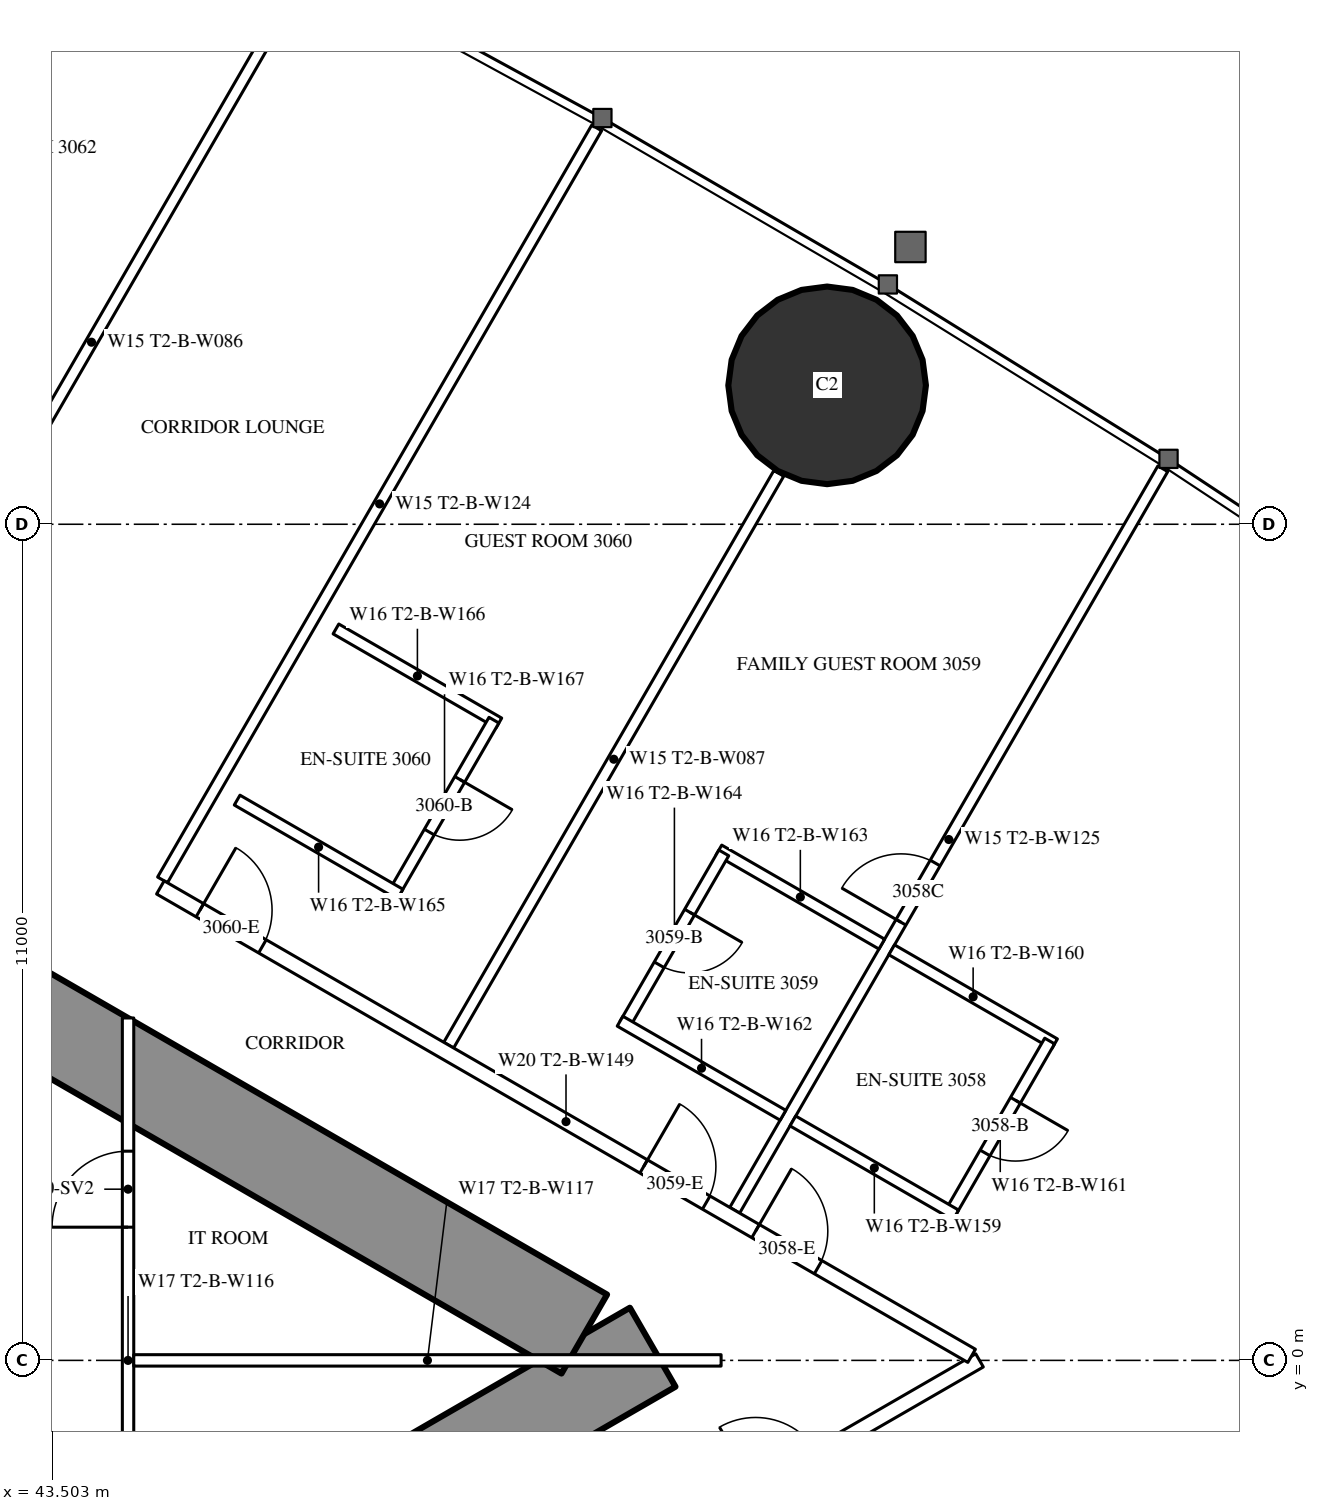
"""IFC4 building model, lengths in metres.
Left out: names, types, materials, properties, quantities, classifications, styles, units other than length and angle.
Written with IfcOpenShell. Run it as: python <this file> out.ifc"""

import sys

from ifc_helpers import new_model, si_unit, direction, frame, frame_2d, origin, origin_2d, place, context, subcontext, project, spatial, rectangle, hollow_circle, extrude, element, fill, save


model = new_model("IFC4")
c1 = context("Model", 3, precision=1e-05, world=origin(), true_north=direction((0.0, 1.0)))
c2 = subcontext(c1, "Body", "Model", "MODEL_VIEW")
j1 = project(units=[si_unit("LENGTHUNIT", "METRE"), si_unit("PLANEANGLEUNIT", "RADIAN")], contexts=[c1])
p1 = place(None, origin())
s1 = spatial("IfcSite", under=j1, at=p1, CompositionType="ELEMENT")
p2 = place(p1, origin())
s2 = spatial("IfcBuilding", under=s1, at=p2, CompositionType="ELEMENT")
p3 = place(p2, frame((0.0, 0.0, 115.1)))
s3 = spatial("IfcBuildingStorey", under=s2, at=p3, CompositionType="ELEMENT", Elevation=115.1)
p4 = place(p3, frame((53.697, 12.827, 0.0), z_axis=(0.0, 0.0, 1.0), x_axis=(1.0, 0.0, 0.0)))
e1 = element("IfcColumn", 1, at=p4, inside=s3, PredefinedType="COLUMN", context=c2, shape_type="SweptSolid", body=[
    extrude(hollow_circle(Radius=1.3, WallThickness=0.1, at=origin_2d()), origin(), (0.0, 0.0, 1.0), 3.5),
])
p5 = place(p3, frame((27.2, -13.8, 0.0), z_axis=(0.0, 0.0, 1.0), x_axis=(0.866027159892, 0.499996958321, 0.0)))
e2 = element("IfcWall", 2, at=p5, inside=s3, PredefinedType="SHEAR", context=c2, shape_type="SweptSolid", body=[
    extrude(rectangle(XDim=27.947, YDim=1.2, at=frame_2d((13.973, 0.0))), origin(), (0.0, 0.0, 1.0), 3.5),
])
p6 = place(p5, frame((4.6, 0.0, 0.0)))
e3 = element("IfcOpeningElement", 3, at=p6, cuts=e2, PredefinedType="OPENING", context=c2, shape_type="SweptSolid", body=[
    extrude(rectangle(XDim=1.0, YDim=2.2, at=frame_2d((0.5, 1.1))), frame((0.0, 0.61, 0.0), z_axis=(0.0, -1.0, 0.0), x_axis=(1.0, 0.0, 0.0)), (0.0, 0.0, 1.0), 1.22),
])
p7 = place(p5, frame((13.395, 0.0, 0.0)))
e4 = element("IfcOpeningElement", 4, at=p7, cuts=e2, PredefinedType="OPENING", context=c2, shape_type="SweptSolid", body=[
    extrude(rectangle(XDim=1.8, YDim=2.2, at=frame_2d((0.9, 1.1))), frame((0.0, 0.61, 0.0), z_axis=(0.0, -1.0, 0.0), x_axis=(1.0, 0.0, 0.0)), (0.0, 0.0, 1.0), 1.22),
])
p8 = place(p3, frame((27.2, 13.8, 0.0), z_axis=(0.0, 0.0, 1.0), x_axis=(0.866024515034, -0.500001539357, 0.0)))
e5 = element("IfcWall", 5, at=p8, inside=s3, PredefinedType="SHEAR", context=c2, shape_type="SweptSolid", body=[
    extrude(rectangle(XDim=26.907, YDim=1.2, at=frame_2d((13.454, 0.0))), origin(), (0.0, 0.0, 1.0), 3.5),
])
p9 = place(p8, frame((4.6, 0.0, 0.0)))
e6 = element("IfcOpeningElement", 6, at=p9, cuts=e5, PredefinedType="OPENING", context=c2, shape_type="SweptSolid", body=[
    extrude(rectangle(XDim=1.0, YDim=2.2, at=frame_2d((0.5, 1.1))), frame((0.0, 0.61, 0.0), z_axis=(0.0, -1.0, 0.0), x_axis=(1.0, 0.0, 0.0)), (0.0, 0.0, 1.0), 1.22),
])
p10 = place(p8, frame((13.395, 0.0, 0.0)))
e7 = element("IfcOpeningElement", 7, at=p10, cuts=e5, PredefinedType="OPENING", context=c2, shape_type="SweptSolid", body=[
    extrude(rectangle(XDim=1.8, YDim=2.2, at=frame_2d((0.9, 1.1))), frame((0.0, 0.61, 0.0), z_axis=(0.0, -1.0, 0.0), x_axis=(1.0, 0.0, 0.0)), (0.0, 0.0, 1.0), 1.22),
])
p11 = place(p3, frame((41.19, 8.494, 0.0), z_axis=(0.0, 0.0, 1.0), x_axis=(0.49999258054, 0.866029687369, 0.0)))
e8 = element("IfcWall", 8, at=p11, inside=s3, PredefinedType="PARTITIONING", context=c2, shape_type="SweptSolid", body=[
    extrude(rectangle(XDim=11.318, YDim=0.15, at=frame_2d((5.659, 0.0))), origin(), (0.0, 0.0, 1.0), 3.25),
])
p12 = place(p3, frame((44.954, 6.321, 0.0), z_axis=(0.0, 0.0, 1.0), x_axis=(0.500009815811, 0.866019736549, 0.0)))
e9 = element("IfcWall", 9, at=p12, inside=s3, PredefinedType="PARTITIONING", context=c2, shape_type="SweptSolid", body=[
    extrude(rectangle(XDim=11.424, YDim=0.15, at=frame_2d((5.712, 0.0))), origin(), (0.0, 0.0, 1.0), 3.25),
])
p13 = place(p3, frame((48.719, 4.147, 0.0), z_axis=(0.0, 0.0, 1.0), x_axis=(0.499993328235, 0.866029255696, 0.0)))
e10 = element("IfcWall", 10, at=p13, inside=s3, PredefinedType="PARTITIONING", context=c2, shape_type="SweptSolid", body=[
    extrude(rectangle(XDim=8.686, YDim=0.15, at=frame_2d((4.343, 0.0))), origin(), (0.0, 0.0, 1.0), 2.2),
])
p14 = place(p3, frame((52.481, 1.975, 0.0), z_axis=(0.0, 0.0, 1.0), x_axis=(0.500003867771, 0.866023170714, 0.0)))
e11 = element("IfcWall", 11, at=p14, inside=s3, PredefinedType="PARTITIONING", context=c2, shape_type="SweptSolid", body=[
    extrude(rectangle(XDim=11.265, YDim=0.15, at=frame_2d((5.632, 0.0))), origin(), (0.0, 0.0, 1.0), 3.25),
])
p15 = place(p14, frame((4.375, 0.0, 0.0)))
e12 = element("IfcOpeningElement", 12, at=p15, cuts=e11, PredefinedType="OPENING", context=c2, shape_type="SweptSolid", body=[
    extrude(rectangle(XDim=0.9, YDim=2.2, at=frame_2d((0.45, 1.1))), frame((0.0, 0.085, 0.0), z_axis=(0.0, -1.0, 0.0), x_axis=(1.0, 0.0, 0.0)), (0.0, 0.0, 1.0), 0.17),
])
p16 = place(p3, frame((37.96, -10.243, 0.0), z_axis=(0.0, 0.0, 1.0), x_axis=(0.866026429433, 0.499998223521, 0.0)))
e13 = element("IfcWall", 13, at=p16, inside=s3, PredefinedType="PARTITIONING", context=c2, shape_type="SweptSolid", body=[
    extrude(rectangle(XDim=20.487, YDim=0.2, at=frame_2d((10.243, 0.0))), origin(), (0.0, 0.0, 1.0), 3.25),
])
p17 = place(p16, frame((4.343, 0.0, 0.0)))
e14 = element("IfcOpeningElement", 14, at=p17, cuts=e13, PredefinedType="OPENING", context=c2, shape_type="SweptSolid", body=[
    extrude(rectangle(XDim=0.95, YDim=2.2, at=frame_2d((0.475, 1.1))), frame((0.0, 0.11, 0.0), z_axis=(0.0, -1.0, 0.0), x_axis=(1.0, 0.0, 0.0)), (0.0, 0.0, 1.0), 0.22),
])
p18 = place(p16, frame((15.385, 0.0, 0.0)))
e15 = element("IfcOpeningElement", 15, at=p18, cuts=e13, PredefinedType="OPENING", context=c2, shape_type="SweptSolid", body=[
    extrude(rectangle(XDim=0.95, YDim=2.2, at=frame_2d((0.475, 1.1))), frame((0.0, 0.11, 0.0), z_axis=(0.0, -1.0, 0.0), x_axis=(1.0, 0.0, 0.0)), (0.0, 0.0, 1.0), 0.22),
])
p19 = place(p16, frame((17.085, 0.0, 0.0)))
e16 = element("IfcOpeningElement", 16, at=p19, cuts=e13, PredefinedType="OPENING", context=c2, shape_type="SweptSolid", body=[
    extrude(rectangle(XDim=0.95, YDim=2.2, at=frame_2d((0.475, 1.1))), frame((0.0, 0.11, 0.0), z_axis=(0.0, -1.0, 0.0), x_axis=(1.0, 0.0, 0.0)), (0.0, 0.0, 1.0), 0.22),
])
p20 = place(p16, frame((1.048, 0.0, 0.0)))
e17 = element("IfcOpeningElement", 17, at=p20, cuts=e13, PredefinedType="OPENING", context=c2, shape_type="SweptSolid", body=[
    extrude(rectangle(XDim=1.8, YDim=2.2, at=frame_2d((0.9, 1.1))), frame((0.0, 0.11, 0.0), z_axis=(0.0, -1.0, 0.0), x_axis=(1.0, 0.0, 0.0)), (0.0, 0.0, 1.0), 0.22),
])
p21 = place(p3, frame((44.925, 6.222, 0.0), z_axis=(0.0, 0.0, 1.0), x_axis=(0.866025590081, -0.499999677325, 0.0)))
e18 = element("IfcWall", 18, at=p21, inside=s3, PredefinedType="PARTITIONING", context=c2, shape_type="SweptSolid", body=[
    extrude(rectangle(XDim=12.324, YDim=0.2, at=frame_2d((6.162, 0.0))), origin(), (0.0, 0.0, 1.0), 3.25),
])
p22 = place(p21, frame((9.042, 0.0, 0.0)))
e19 = element("IfcOpeningElement", 19, at=p22, cuts=e18, PredefinedType="OPENING", context=c2, shape_type="SweptSolid", body=[
    extrude(rectangle(XDim=0.95, YDim=2.2, at=frame_2d((0.475, 1.1))), frame((0.0, 0.11, 0.0), z_axis=(0.0, -1.0, 0.0), x_axis=(1.0, 0.0, 0.0)), (0.0, 0.0, 1.0), 0.22),
])
p23 = place(p21, frame((7.342, 0.0, 0.0)))
e20 = element("IfcOpeningElement", 20, at=p23, cuts=e18, PredefinedType="OPENING", context=c2, shape_type="SweptSolid", body=[
    extrude(rectangle(XDim=0.95, YDim=2.2, at=frame_2d((0.475, 1.1))), frame((0.0, 0.11, 0.0), z_axis=(0.0, -1.0, 0.0), x_axis=(1.0, 0.0, 0.0)), (0.0, 0.0, 1.0), 0.22),
])
p24 = place(p21, frame((0.6, 0.0, 0.0)))
e21 = element("IfcOpeningElement", 21, at=p24, cuts=e18, PredefinedType="OPENING", context=c2, shape_type="SweptSolid", body=[
    extrude(rectangle(XDim=0.95, YDim=2.2, at=frame_2d((0.475, 1.1))), frame((0.0, 0.11, 0.0), z_axis=(0.0, -1.0, 0.0), x_axis=(1.0, 0.0, 0.0)), (0.0, 0.0, 1.0), 0.22),
])
p25 = place(p3, frame((54.546, 5.402, 0.0), z_axis=(0.0, 0.0, 1.0), x_axis=(0.866006523861, -0.500032699561, 0.0)))
e22 = element("IfcWall", 22, at=p25, inside=s3, PredefinedType="PARTITIONING", context=c2, shape_type="SweptSolid", body=[
    extrude(rectangle(XDim=2.475, YDim=0.15, at=frame_2d((1.237, 0.0))), origin(), (0.0, 0.0, 1.0), 3.25),
])
p26 = place(p3, frame((55.325, 1.95, 0.0), z_axis=(0.0, 0.0, 1.0), x_axis=(0.500006934395, 0.866021400173, 0.0)))
e23 = element("IfcWall", 23, at=p26, inside=s3, PredefinedType="PARTITIONING", context=c2, shape_type="SweptSolid", body=[
    extrude(rectangle(XDim=2.6, YDim=0.15, at=frame_2d((1.3, 0.0))), origin(), (0.0, 0.0, 1.0), 3.25),
])
p27 = place(p26, frame((0.9, 0.0, 0.0)))
e24 = element("IfcOpeningElement", 24, at=p27, cuts=e23, PredefinedType="OPENING", context=c2, shape_type="SweptSolid", body=[
    extrude(rectangle(XDim=0.8, YDim=2.2, at=frame_2d((0.4, 1.1))), frame((0.0, 0.085, 0.0), z_axis=(0.0, -1.0, 0.0), x_axis=(1.0, 0.0, 0.0)), (0.0, 0.0, 1.0), 0.17),
])
p28 = place(p3, frame((53.246, 3.15, 0.0), z_axis=(0.0, 0.0, 1.0), x_axis=(0.866006523861, -0.500032699561, 0.0)))
e25 = element("IfcWall", 25, at=p28, inside=s3, PredefinedType="PARTITIONING", context=c2, shape_type="SweptSolid", body=[
    extrude(rectangle(XDim=2.475, YDim=0.15, at=frame_2d((1.237, 0.0))), origin(), (0.0, 0.0, 1.0), 3.25),
])
p29 = place(p3, frame((52.273, 6.714, 0.0), z_axis=(0.0, 0.0, 1.0), x_axis=(0.866031185235, -0.4999899861, 0.0)))
e26 = element("IfcWall", 26, at=p29, inside=s3, PredefinedType="PARTITIONING", context=c2, shape_type="SweptSolid", body=[
    extrude(rectangle(XDim=2.475, YDim=0.15, at=frame_2d((1.238, 0.0))), origin(), (0.0, 0.0, 1.0), 3.25),
])
p30 = place(p3, frame((51.038, 4.425, 0.0), z_axis=(0.0, 0.0, 1.0), x_axis=(0.49997716683, 0.86603858612, 0.0)))
e27 = element("IfcWall", 27, at=p30, inside=s3, PredefinedType="PARTITIONING", context=c2, shape_type="SweptSolid", body=[
    extrude(rectangle(XDim=2.6, YDim=0.15, at=frame_2d((1.3, 0.0))), origin(), (0.0, 0.0, 1.0), 3.25),
])
p31 = place(p30, frame((0.9, 0.0, 0.0)))
e28 = element("IfcOpeningElement", 28, at=p31, cuts=e27, PredefinedType="OPENING", context=c2, shape_type="SweptSolid", body=[
    extrude(rectangle(XDim=0.8, YDim=2.2, at=frame_2d((0.4, 1.1))), frame((0.0, 0.085, 0.0), z_axis=(0.0, -1.0, 0.0), x_axis=(1.0, 0.0, 0.0)), (0.0, 0.0, 1.0), 0.17),
])
p32 = place(p3, frame((50.973, 4.462, 0.0), z_axis=(0.0, 0.0, 1.0), x_axis=(0.866031185235, -0.4999899861, 0.0)))
e29 = element("IfcWall", 29, at=p32, inside=s3, PredefinedType="PARTITIONING", context=c2, shape_type="SweptSolid", body=[
    extrude(rectangle(XDim=2.475, YDim=0.15, at=frame_2d((1.238, 0.0))), origin(), (0.0, 0.0, 1.0), 3.25),
])
p33 = place(p3, frame((47.235, 9.623, 0.0), z_axis=(0.0, 0.0, 1.0), x_axis=(0.866006523861, -0.500032699561, 0.0)))
e30 = element("IfcWall", 30, at=p33, inside=s3, PredefinedType="PARTITIONING", context=c2, shape_type="SweptSolid", body=[
    extrude(rectangle(XDim=2.475, YDim=0.15, at=frame_2d((1.237, 0.0))), origin(), (0.0, 0.0, 1.0), 3.25),
])
p34 = place(p3, frame((48.013, 6.171, 0.0), z_axis=(0.0, 0.0, 1.0), x_axis=(0.500006934395, 0.866021400173, 0.0)))
e31 = element("IfcWall", 31, at=p34, inside=s3, PredefinedType="PARTITIONING", context=c2, shape_type="SweptSolid", body=[
    extrude(rectangle(XDim=2.6, YDim=0.15, at=frame_2d((1.3, 0.0))), origin(), (0.0, 0.0, 1.0), 3.25),
])
p35 = place(p34, frame((0.9, 0.0, 0.0)))
e32 = element("IfcOpeningElement", 32, at=p35, cuts=e31, PredefinedType="OPENING", context=c2, shape_type="SweptSolid", body=[
    extrude(rectangle(XDim=0.8, YDim=2.2, at=frame_2d((0.4, 1.1))), frame((0.0, 0.085, 0.0), z_axis=(0.0, -1.0, 0.0), x_axis=(1.0, 0.0, 0.0)), (0.0, 0.0, 1.0), 0.17),
])
p36 = place(p3, frame((45.935, 7.371, 0.0), z_axis=(0.0, 0.0, 1.0), x_axis=(0.866031185235, -0.4999899861, 0.0)))
e33 = element("IfcWall", 33, at=p36, inside=s3, PredefinedType="PARTITIONING", context=c2, shape_type="SweptSolid", body=[
    extrude(rectangle(XDim=2.475, YDim=0.15, at=frame_2d((1.238, 0.0))), origin(), (0.0, 0.0, 1.0), 3.25),
])
p37 = place(p3, frame((44.5, -4.505, 0.0), z_axis=(0.0, 0.0, 1.0), x_axis=(0.0, 1.0, 0.0)))
e34 = element("IfcWall", 34, at=p37, inside=s3, PredefinedType="PARTITIONING", context=c2, shape_type="SweptSolid", body=[
    extrude(rectangle(XDim=9.009, YDim=0.15, at=frame_2d((4.505, 0.0))), origin(), (0.0, 0.0, 1.0), 2.45),
])
p38 = place(p37, frame((1.752, 0.0, 0.0)))
e35 = element("IfcOpeningElement", 35, at=p38, cuts=e34, PredefinedType="OPENING", context=c2, shape_type="SweptSolid", body=[
    extrude(rectangle(XDim=1.0, YDim=2.2, at=frame_2d((0.5, 1.1))), frame((0.0, 0.085, 0.0), z_axis=(0.0, -1.0, 0.0), x_axis=(1.0, 0.0, 0.0)), (0.0, 0.0, 1.0), 0.17),
])
p39 = place(p37, frame((6.257, 0.0, 0.0)))
e36 = element("IfcOpeningElement", 36, at=p39, cuts=e34, PredefinedType="OPENING", context=c2, shape_type="SweptSolid", body=[
    extrude(rectangle(XDim=1.0, YDim=2.2, at=frame_2d((0.5, 1.1))), frame((0.0, 0.085, 0.0), z_axis=(0.0, -1.0, 0.0), x_axis=(1.0, 0.0, 0.0)), (0.0, 0.0, 1.0), 0.17),
])
p40 = place(p3, frame((44.575, 0.0, 0.0), z_axis=(0.0, 0.0, 1.0), x_axis=(1.0, 0.0, 0.0)))
e37 = element("IfcWall", 37, at=p40, inside=s3, PredefinedType="PARTITIONING", context=c2, shape_type="SweptSolid", body=[
    extrude(rectangle(XDim=7.727, YDim=0.15, at=frame_2d((3.864, 0.0))), origin(), (0.0, 0.0, 1.0), 2.2),
])
p41 = place(p27, origin())
e38 = element("IfcDoor", 38, at=p41, inside=s3, OperationType="SINGLE_SWING_RIGHT", PredefinedType="DOOR", context=c2, shape_type="SweptSolid", body=[
    extrude(rectangle(XDim=0.8, YDim=2.2, at=frame_2d((0.4, 1.1))), frame((0.0, 0.025, 0.0), z_axis=(0.0, -1.0, 0.0), x_axis=(1.0, 0.0, 0.0)), (0.0, 0.0, 1.0), 0.05),
])
fill(e24, e38)
p42 = place(p22, origin())
e39 = element("IfcDoor", 39, at=p42, inside=s3, OperationType="SINGLE_SWING_LEFT", PredefinedType="DOOR", context=c2, shape_type="SweptSolid", body=[
    extrude(rectangle(XDim=0.95, YDim=2.2, at=frame_2d((0.475, 1.1))), frame((0.0, 0.025, 0.0), z_axis=(0.0, -1.0, 0.0), x_axis=(1.0, 0.0, 0.0)), (0.0, 0.0, 1.0), 0.05),
])
fill(e19, e39)
p43 = place(p31, origin())
e40 = element("IfcDoor", 40, at=p43, inside=s3, OperationType="SINGLE_SWING_RIGHT", PredefinedType="DOOR", context=c2, shape_type="SweptSolid", body=[
    extrude(rectangle(XDim=0.8, YDim=2.2, at=frame_2d((0.4, 1.1))), frame((0.0, 0.025, 0.0), z_axis=(0.0, -1.0, 0.0), x_axis=(1.0, 0.0, 0.0)), (0.0, 0.0, 1.0), 0.05),
])
fill(e28, e40)
p44 = place(p23, origin())
e41 = element("IfcDoor", 41, at=p44, inside=s3, OperationType="SINGLE_SWING_LEFT", PredefinedType="DOOR", context=c2, shape_type="SweptSolid", body=[
    extrude(rectangle(XDim=0.95, YDim=2.2, at=frame_2d((0.475, 1.1))), frame((0.0, 0.025, 0.0), z_axis=(0.0, -1.0, 0.0), x_axis=(1.0, 0.0, 0.0)), (0.0, 0.0, 1.0), 0.05),
])
fill(e20, e41)
p45 = place(p35, origin())
e42 = element("IfcDoor", 42, at=p45, inside=s3, OperationType="SINGLE_SWING_RIGHT", PredefinedType="DOOR", context=c2, shape_type="SweptSolid", body=[
    extrude(rectangle(XDim=0.8, YDim=2.2, at=frame_2d((0.4, 1.1))), frame((0.0, 0.025, 0.0), z_axis=(0.0, -1.0, 0.0), x_axis=(1.0, 0.0, 0.0)), (0.0, 0.0, 1.0), 0.05),
])
fill(e32, e42)
p46 = place(p24, origin())
e43 = element("IfcDoor", 43, at=p46, inside=s3, OperationType="SINGLE_SWING_LEFT", PredefinedType="DOOR", context=c2, shape_type="SweptSolid", body=[
    extrude(rectangle(XDim=0.95, YDim=2.2, at=frame_2d((0.475, 1.1))), frame((0.0, 0.025, 0.0), z_axis=(0.0, -1.0, 0.0), x_axis=(1.0, 0.0, 0.0)), (0.0, 0.0, 1.0), 0.05),
])
fill(e21, e43)
p47 = place(p15, origin())
e44 = element("IfcDoor", 44, at=p47, inside=s3, OperationType="SINGLE_SWING_LEFT", PredefinedType="DOOR", context=c2, shape_type="SweptSolid", body=[
    extrude(rectangle(XDim=0.9, YDim=2.2, at=frame_2d((0.45, 1.1))), frame((0.0, 0.025, 0.0), z_axis=(0.0, -1.0, 0.0), x_axis=(1.0, 0.0, 0.0)), (0.0, 0.0, 1.0), 0.05),
])
fill(e12, e44)
p48 = place(p39, origin())
e45 = element("IfcDoor", 45, at=p48, inside=s3, OperationType="SINGLE_SWING_LEFT", PredefinedType="DOOR", context=c2, shape_type="SweptSolid", body=[
    extrude(rectangle(XDim=1.0, YDim=2.2, at=frame_2d((0.5, 1.1))), frame((0.0, 0.025, 0.0), z_axis=(0.0, -1.0, 0.0), x_axis=(1.0, 0.0, 0.0)), (0.0, 0.0, 1.0), 0.05),
])
fill(e36, e45)
save(model, sys.argv[1])
